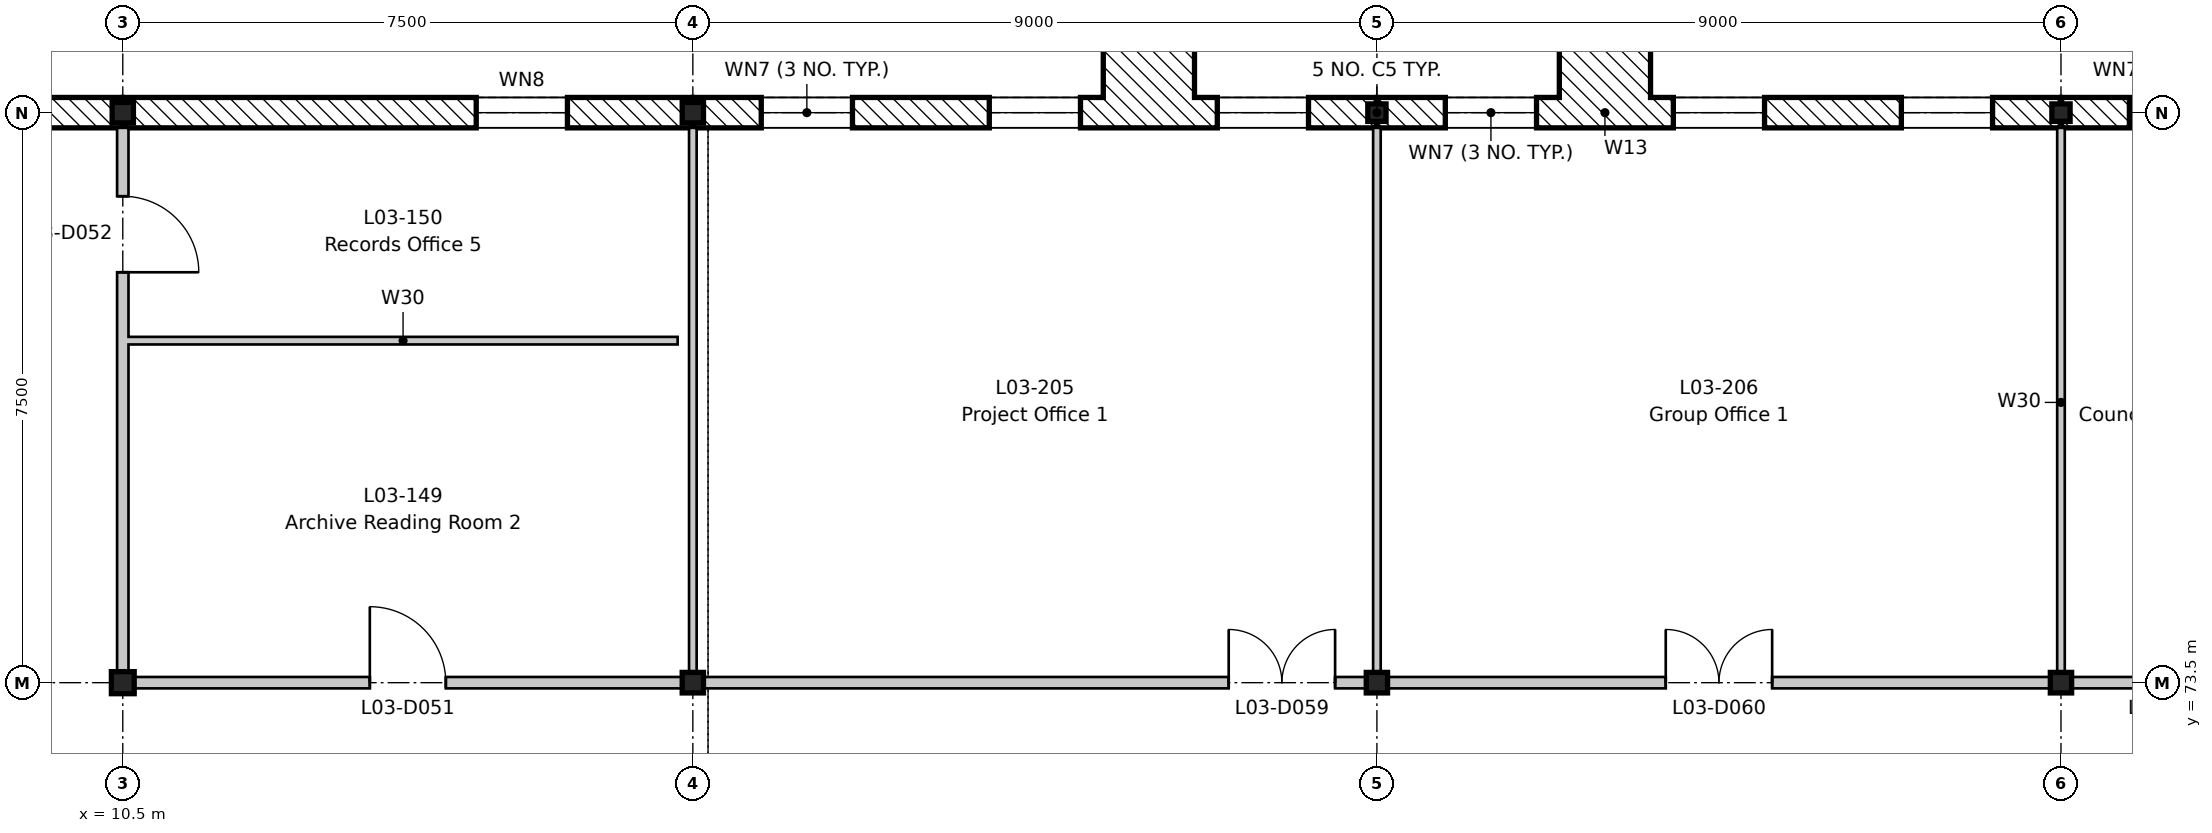
"""IFC4 building model, lengths in metres.
Left out: names, types, materials, properties, quantities, classifications, styles, units other than length and angle.
Written with IfcOpenShell. Run it as: python <this file> out.ifc"""

import sys

from ifc_helpers import new_model, si_unit, direction, frame, frame_2d, origin, origin_2d, place, context, subcontext, project, spatial, rectangle, i_section, extrude, element, fill, save


model = new_model("IFC4")
c1 = context("Model", 3, precision=1e-05, world=origin(), true_north=direction((0.0, 1.0)))
c2 = subcontext(c1, "Body", "Model", "MODEL_VIEW")
j1 = project(units=[si_unit("LENGTHUNIT", "METRE"), si_unit("PLANEANGLEUNIT", "RADIAN")], contexts=[c1])
p1 = place(None, origin())
s1 = spatial("IfcSite", under=j1, at=p1, CompositionType="ELEMENT")
p2 = place(p1, origin())
s2 = spatial("IfcBuilding", under=s1, at=p2, CompositionType="ELEMENT")
p3 = place(p2, frame((0.0, 0.0, 14.4)))
s3 = spatial("IfcBuildingStorey", under=s2, at=p3, CompositionType="ELEMENT", Elevation=14.4)
p4 = place(p3, frame((10.5, 73.5, -0.2), z_axis=(0.0, 0.0, 1.0), x_axis=(1.0, 0.0, 0.0)))
e1 = element("IfcColumn", 1, at=p4, inside=s3, PredefinedType="COLUMN", context=c2, shape_type="SweptSolid", body=[
    extrude(i_section(OverallWidth=0.3, OverallDepth=0.29, WebThickness=0.009, FlangeThickness=0.014, FilletRadius=0.027, at=origin_2d()), origin(), (0.0, 0.0, 1.0), 4.2),
])
for number, where, z_axis, x_axis in (
    (2, (10.5, 81.0, -0.2), (0.0, 0.0, 1.0), (1.0, 0.0, 0.0)),
    (3, (18.0, 73.5, -0.2), (0.0, 0.0, 1.0), (1.0, 0.0, 0.0)),
    (4, (18.0, 81.0, -0.2), (0.0, 0.0, 1.0), (1.0, 0.0, 0.0)),
    (5, (27.0, 73.5, -0.2), (0.0, 0.0, 1.0), (1.0, 0.0, 0.0)),
):
    element("IfcColumn", number, at=place(p3, frame(where, z_axis=z_axis, x_axis=x_axis)), inside=s3, PredefinedType="COLUMN", context=c2, shape_type="SweptSolid", body=[
        extrude(i_section(OverallWidth=0.28, OverallDepth=0.27, WebThickness=0.008, FlangeThickness=0.013, FilletRadius=0.024, at=origin_2d()), origin(), (0.0, 0.0, 1.0), 4.2),
    ])
p5 = place(p3, frame((27.0, 81.0, -0.2), z_axis=(0.0, 0.0, 1.0), x_axis=(1.0, 0.0, 0.0)))
e6 = element("IfcColumn", 6, at=p5, inside=s3, PredefinedType="COLUMN", context=c2, shape_type="SweptSolid", body=[
    extrude(i_section(OverallWidth=0.24, OverallDepth=0.23, WebThickness=0.008, FlangeThickness=0.012, FilletRadius=0.021, at=origin_2d()), origin(), (0.0, 0.0, 1.0), 4.2),
])
p6 = place(p3, frame((36.0, 73.5, -0.2), z_axis=(0.0, 0.0, 1.0), x_axis=(1.0, 0.0, 0.0)))
e7 = element("IfcColumn", 7, at=p6, inside=s3, PredefinedType="COLUMN", context=c2, shape_type="SweptSolid", body=[
    extrude(i_section(OverallWidth=0.28, OverallDepth=0.27, WebThickness=0.008, FlangeThickness=0.013, FilletRadius=0.024, at=origin_2d()), origin(), (0.0, 0.0, 1.0), 4.2),
])
p7 = place(p3, frame((36.0, 81.0, -0.2), z_axis=(0.0, 0.0, 1.0), x_axis=(1.0, 0.0, 0.0)))
e8 = element("IfcColumn", 8, at=p7, inside=s3, PredefinedType="COLUMN", context=c2, shape_type="SweptSolid", body=[
    extrude(i_section(OverallWidth=0.24, OverallDepth=0.23, WebThickness=0.008, FlangeThickness=0.012, FilletRadius=0.021, at=origin_2d()), origin(), (0.0, 0.0, 1.0), 4.2),
])
p8 = place(p3, frame((7.509, 81.0, 0.0), z_axis=(0.0, 0.0, 1.0), x_axis=(1.0, 0.0, 0.0)))
e9 = element("IfcWall", 9, at=p8, inside=s3, PredefinedType="STANDARD", context=c2, shape_type="SweptSolid", body=[
    extrude(rectangle(XDim=2.982, YDim=0.4, at=frame_2d((1.491, 0.0))), origin(), (0.0, 0.0, 1.0), 3.8),
])
p9 = place(p3, frame((10.509, 81.0, 0.0), z_axis=(0.0, 0.0, 1.0), x_axis=(1.0, 0.0, 0.0)))
e10 = element("IfcWall", 10, at=p9, inside=s3, PredefinedType="STANDARD", context=c2, shape_type="SweptSolid", body=[
    extrude(rectangle(XDim=7.482, YDim=0.4, at=frame_2d((3.741, 0.0))), origin(), (0.0, 0.0, 1.0), 3.67),
])
p10 = place(p9, frame((4.641, 0.0, 0.6)))
e11 = element("IfcOpeningElement", 11, at=p10, cuts=e10, PredefinedType="OPENING", context=c2, shape_type="SweptSolid", body=[
    extrude(rectangle(XDim=1.2, YDim=2.7, at=frame_2d((0.6, 1.35))), frame((0.0, 0.21, 0.0), z_axis=(0.0, -1.0, 0.0), x_axis=(1.0, 0.0, 0.0)), (0.0, 0.0, 1.0), 0.42),
])
p11 = place(p3, frame((18.009, 81.0, 0.0), z_axis=(0.0, 0.0, 1.0), x_axis=(1.0, 0.0, 0.0)))
e12 = element("IfcWall", 12, at=p11, inside=s3, PredefinedType="STANDARD", context=c2, shape_type="SweptSolid", body=[
    extrude(rectangle(XDim=8.982, YDim=0.4, at=frame_2d((4.491, 0.0))), origin(), (0.0, 0.0, 1.0), 3.6),
])
p12 = place(p11, frame((0.891, 0.0, 0.9)))
e13 = element("IfcOpeningElement", 13, at=p12, cuts=e12, PredefinedType="OPENING", context=c2, shape_type="SweptSolid", body=[
    extrude(rectangle(XDim=1.2, YDim=2.4, at=frame_2d((0.6, 1.2))), frame((0.0, 0.21, 0.0), z_axis=(0.0, -1.0, 0.0), x_axis=(1.0, 0.0, 0.0)), (0.0, 0.0, 1.0), 0.42),
])
p13 = place(p11, frame((3.891, 0.0, 0.9)))
e14 = element("IfcOpeningElement", 14, at=p13, cuts=e12, PredefinedType="OPENING", context=c2, shape_type="SweptSolid", body=[
    extrude(rectangle(XDim=1.2, YDim=2.4, at=frame_2d((0.6, 1.2))), frame((0.0, 0.21, 0.0), z_axis=(0.0, -1.0, 0.0), x_axis=(1.0, 0.0, 0.0)), (0.0, 0.0, 1.0), 0.42),
])
p14 = place(p11, frame((6.891, 0.0, 0.9)))
e15 = element("IfcOpeningElement", 15, at=p14, cuts=e12, PredefinedType="OPENING", context=c2, shape_type="SweptSolid", body=[
    extrude(rectangle(XDim=1.2, YDim=2.4, at=frame_2d((0.6, 1.2))), frame((0.0, 0.21, 0.0), z_axis=(0.0, -1.0, 0.0), x_axis=(1.0, 0.0, 0.0)), (0.0, 0.0, 1.0), 0.42),
])
p15 = place(p3, frame((27.009, 81.0, 0.0), z_axis=(0.0, 0.0, 1.0), x_axis=(1.0, 0.0, 0.0)))
e16 = element("IfcWall", 16, at=p15, inside=s3, PredefinedType="STANDARD", context=c2, shape_type="SweptSolid", body=[
    extrude(rectangle(XDim=8.982, YDim=0.4, at=frame_2d((4.491, 0.0))), origin(), (0.0, 0.0, 1.0), 3.6),
])
p16 = place(p15, frame((0.891, 0.0, 0.9)))
e17 = element("IfcOpeningElement", 17, at=p16, cuts=e16, PredefinedType="OPENING", context=c2, shape_type="SweptSolid", body=[
    extrude(rectangle(XDim=1.2, YDim=2.4, at=frame_2d((0.6, 1.2))), frame((0.0, 0.21, 0.0), z_axis=(0.0, -1.0, 0.0), x_axis=(1.0, 0.0, 0.0)), (0.0, 0.0, 1.0), 0.42),
])
p17 = place(p15, frame((3.891, 0.0, 0.9)))
e18 = element("IfcOpeningElement", 18, at=p17, cuts=e16, PredefinedType="OPENING", context=c2, shape_type="SweptSolid", body=[
    extrude(rectangle(XDim=1.2, YDim=2.4, at=frame_2d((0.6, 1.2))), frame((0.0, 0.21, 0.0), z_axis=(0.0, -1.0, 0.0), x_axis=(1.0, 0.0, 0.0)), (0.0, 0.0, 1.0), 0.42),
])
p18 = place(p15, frame((6.891, 0.0, 0.9)))
e19 = element("IfcOpeningElement", 19, at=p18, cuts=e16, PredefinedType="OPENING", context=c2, shape_type="SweptSolid", body=[
    extrude(rectangle(XDim=1.2, YDim=2.4, at=frame_2d((0.6, 1.2))), frame((0.0, 0.21, 0.0), z_axis=(0.0, -1.0, 0.0), x_axis=(1.0, 0.0, 0.0)), (0.0, 0.0, 1.0), 0.42),
])
p19 = place(p3, frame((36.009, 81.0, 0.0), z_axis=(0.0, 0.0, 1.0), x_axis=(1.0, 0.0, 0.0)))
e20 = element("IfcWall", 20, at=p19, inside=s3, PredefinedType="STANDARD", context=c2, shape_type="SweptSolid", body=[
    extrude(rectangle(XDim=8.982, YDim=0.4, at=frame_2d((4.491, 0.0))), origin(), (0.0, 0.0, 1.0), 3.6),
])
p20 = place(p19, frame((0.891, 0.0, 0.9)))
e21 = element("IfcOpeningElement", 21, at=p20, cuts=e20, PredefinedType="OPENING", context=c2, shape_type="SweptSolid", body=[
    extrude(rectangle(XDim=1.2, YDim=2.4, at=frame_2d((0.6, 1.2))), frame((0.0, 0.21, 0.0), z_axis=(0.0, -1.0, 0.0), x_axis=(1.0, 0.0, 0.0)), (0.0, 0.0, 1.0), 0.42),
])
p21 = place(p19, frame((3.891, 0.0, 0.9)))
e22 = element("IfcOpeningElement", 22, at=p21, cuts=e20, PredefinedType="OPENING", context=c2, shape_type="SweptSolid", body=[
    extrude(rectangle(XDim=1.2, YDim=2.4, at=frame_2d((0.6, 1.2))), frame((0.0, 0.21, 0.0), z_axis=(0.0, -1.0, 0.0), x_axis=(1.0, 0.0, 0.0)), (0.0, 0.0, 1.0), 0.42),
])
p22 = place(p19, frame((6.891, 0.0, 0.9)))
e23 = element("IfcOpeningElement", 23, at=p22, cuts=e20, PredefinedType="OPENING", context=c2, shape_type="SweptSolid", body=[
    extrude(rectangle(XDim=1.2, YDim=2.4, at=frame_2d((0.6, 1.2))), frame((0.0, 0.21, 0.0), z_axis=(0.0, -1.0, 0.0), x_axis=(1.0, 0.0, 0.0)), (0.0, 0.0, 1.0), 0.42),
])
for number, where, z_axis, x_axis in (
    (24, (23.4, 81.8, 0.0), (0.0, 0.0, 1.0), (1.0, 0.0, 0.0)),
    (25, (29.4, 81.8, 0.0), (0.0, 0.0, 1.0), (1.0, 0.0, 0.0)),
):
    element("IfcWall", number, at=place(p3, frame(where, z_axis=z_axis, x_axis=x_axis)), inside=s3, PredefinedType="STANDARD", context=c2, shape_type="SweptSolid", body=[
        extrude(rectangle(XDim=1.2, YDim=1.2, at=frame_2d((0.6, 0.0))), origin(), (0.0, 0.0, 1.0), 4.2),
    ])
p23 = place(p3, frame((10.5, 73.5, 0.0), z_axis=(0.0, 0.0, 1.0), x_axis=(0.0, 1.0, 0.0)))
e26 = element("IfcWall", 26, at=p23, inside=s3, PredefinedType="PARTITIONING", context=c2, shape_type="SweptSolid", body=[
    extrude(rectangle(XDim=7.3, YDim=0.15, at=frame_2d((3.65, 0.0))), origin(), (0.0, 0.0, 1.0), 3.48),
])
p24 = place(p23, frame((5.4, 0.0, 0.0)))
e27 = element("IfcOpeningElement", 27, at=p24, cuts=e26, PredefinedType="OPENING", context=c2, shape_type="SweptSolid", body=[
    extrude(rectangle(XDim=1.0, YDim=2.1, at=frame_2d((0.5, 1.05))), frame((0.0, 0.085, 0.0), z_axis=(0.0, -1.0, 0.0), x_axis=(1.0, 0.0, 0.0)), (0.0, 0.0, 1.0), 0.17),
])
p25 = place(p3, frame((10.575, 73.5, 0.0), z_axis=(0.0, 0.0, 1.0), x_axis=(1.0, 0.0, 0.0)))
e28 = element("IfcWall", 28, at=p25, inside=s3, PredefinedType="PARTITIONING", context=c2, shape_type="SweptSolid", body=[
    extrude(rectangle(XDim=7.425, YDim=0.15, at=frame_2d((3.712, 0.0))), origin(), (0.0, 0.0, 1.0), 3.65),
])
p26 = place(p25, frame((3.175, 0.0, 0.0)))
e29 = element("IfcOpeningElement", 29, at=p26, cuts=e28, PredefinedType="OPENING", context=c2, shape_type="SweptSolid", body=[
    extrude(rectangle(XDim=1.0, YDim=2.1, at=frame_2d((0.5, 1.05))), frame((0.0, 0.085, 0.0), z_axis=(0.0, -1.0, 0.0), x_axis=(1.0, 0.0, 0.0)), (0.0, 0.0, 1.0), 0.17),
])
p27 = place(p3, frame((10.575, 78.0, 0.0), z_axis=(0.0, 0.0, 1.0), x_axis=(1.0, 0.0, 0.0)))
e30 = element("IfcWall", 30, at=p27, inside=s3, PredefinedType="PARTITIONING", context=c2, shape_type="SweptSolid", body=[
    extrude(rectangle(XDim=7.225, YDim=0.1, at=frame_2d((3.613, 0.0))), origin(), (0.0, 0.0, 1.0), 4.0),
])
p28 = place(p3, frame((18.0, 73.575, 0.0), z_axis=(0.0, 0.0, 1.0), x_axis=(0.0, 1.0, 0.0)))
e31 = element("IfcWall", 31, at=p28, inside=s3, PredefinedType="PARTITIONING", context=c2, shape_type="SweptSolid", body=[
    extrude(rectangle(XDim=7.225, YDim=0.1, at=frame_2d((3.613, 0.0))), origin(), (0.0, 0.0, 1.0), 3.58),
])
for number, where, z_axis, x_axis in (
    (32, (27.0, 73.575, 0.0), (0.0, 0.0, 1.0), (0.0, 1.0, 0.0)),
    (33, (36.0, 73.575, 0.0), (0.0, 0.0, 1.0), (0.0, 1.0, 0.0)),
):
    element("IfcWall", number, at=place(p3, frame(where, z_axis=z_axis, x_axis=x_axis)), inside=s3, PredefinedType="PARTITIONING", context=c2, shape_type="SweptSolid", body=[
        extrude(rectangle(XDim=7.225, YDim=0.1, at=frame_2d((3.613, 0.0))), origin(), (0.0, 0.0, 1.0), 3.65),
    ])
p29 = place(p3, frame((18.0, 73.5, 0.0), z_axis=(0.0, 0.0, 1.0), x_axis=(1.0, 0.0, 0.0)))
e34 = element("IfcWall", 34, at=p29, inside=s3, PredefinedType="PARTITIONING", context=c2, shape_type="SweptSolid", body=[
    extrude(rectangle(XDim=35.8, YDim=0.15, at=frame_2d((17.9, 0.0))), origin(), (0.0, 0.0, 1.0), 3.48),
])
p30 = place(p29, frame((7.05, 0.0, 0.0)))
e35 = element("IfcOpeningElement", 35, at=p30, cuts=e34, PredefinedType="OPENING", context=c2, shape_type="SweptSolid", body=[
    extrude(rectangle(XDim=1.4, YDim=2.1, at=frame_2d((0.7, 1.05))), frame((0.0, 0.085, 0.0), z_axis=(0.0, -1.0, 0.0), x_axis=(1.0, 0.0, 0.0)), (0.0, 0.0, 1.0), 0.17),
])
p31 = place(p29, frame((12.8, 0.0, 0.0)))
e36 = element("IfcOpeningElement", 36, at=p31, cuts=e34, PredefinedType="OPENING", context=c2, shape_type="SweptSolid", body=[
    extrude(rectangle(XDim=1.4, YDim=2.1, at=frame_2d((0.7, 1.05))), frame((0.0, 0.085, 0.0), z_axis=(0.0, -1.0, 0.0), x_axis=(1.0, 0.0, 0.0)), (0.0, 0.0, 1.0), 0.17),
])
p32 = place(p29, frame((19.0, 0.0, 0.0)))
e37 = element("IfcOpeningElement", 37, at=p32, cuts=e34, PredefinedType="OPENING", context=c2, shape_type="SweptSolid", body=[
    extrude(rectangle(XDim=1.0, YDim=2.1, at=frame_2d((0.5, 1.05))), frame((0.0, 0.085, 0.0), z_axis=(0.0, -1.0, 0.0), x_axis=(1.0, 0.0, 0.0)), (0.0, 0.0, 1.0), 0.17),
])
p33 = place(p29, frame((22.0, 0.0, 0.0)))
e38 = element("IfcOpeningElement", 38, at=p33, cuts=e34, PredefinedType="OPENING", context=c2, shape_type="SweptSolid", body=[
    extrude(rectangle(XDim=1.0, YDim=2.1, at=frame_2d((0.5, 1.05))), frame((0.0, 0.085, 0.0), z_axis=(0.0, -1.0, 0.0), x_axis=(1.0, 0.0, 0.0)), (0.0, 0.0, 1.0), 0.17),
])
p34 = place(p29, frame((25.0, 0.0, 0.0)))
e39 = element("IfcOpeningElement", 39, at=p34, cuts=e34, PredefinedType="OPENING", context=c2, shape_type="SweptSolid", body=[
    extrude(rectangle(XDim=1.0, YDim=2.1, at=frame_2d((0.5, 1.05))), frame((0.0, 0.085, 0.0), z_axis=(0.0, -1.0, 0.0), x_axis=(1.0, 0.0, 0.0)), (0.0, 0.0, 1.0), 0.17),
])
p35 = place(p29, frame((28.0, 0.0, 0.0)))
e40 = element("IfcOpeningElement", 40, at=p35, cuts=e34, PredefinedType="OPENING", context=c2, shape_type="SweptSolid", body=[
    extrude(rectangle(XDim=1.0, YDim=2.1, at=frame_2d((0.5, 1.05))), frame((0.0, 0.085, 0.0), z_axis=(0.0, -1.0, 0.0), x_axis=(1.0, 0.0, 0.0)), (0.0, 0.0, 1.0), 0.17),
])
p36 = place(p29, frame((31.0, 0.0, 0.0)))
e41 = element("IfcOpeningElement", 41, at=p36, cuts=e34, PredefinedType="OPENING", context=c2, shape_type="SweptSolid", body=[
    extrude(rectangle(XDim=1.0, YDim=2.1, at=frame_2d((0.5, 1.05))), frame((0.0, 0.085, 0.0), z_axis=(0.0, -1.0, 0.0), x_axis=(1.0, 0.0, 0.0)), (0.0, 0.0, 1.0), 0.17),
])
p37 = place(p29, frame((34.0, 0.0, 0.0)))
e42 = element("IfcOpeningElement", 42, at=p37, cuts=e34, PredefinedType="OPENING", context=c2, shape_type="SweptSolid", body=[
    extrude(rectangle(XDim=1.0, YDim=2.1, at=frame_2d((0.5, 1.05))), frame((0.0, 0.085, 0.0), z_axis=(0.0, -1.0, 0.0), x_axis=(1.0, 0.0, 0.0)), (0.0, 0.0, 1.0), 0.17),
])
p38 = place(p10, origin())
e43 = element("IfcWindow", 43, at=p38, inside=s3, PartitioningType="SINGLE_PANEL", PredefinedType="WINDOW", context=c2, shape_type="SweptSolid", body=[
    extrude(rectangle(XDim=1.2, YDim=2.7, at=frame_2d((0.6, 1.35))), frame((0.0, 0.03, 0.0), z_axis=(0.0, -1.0, 0.0), x_axis=(1.0, 0.0, 0.0)), (0.0, 0.0, 1.0), 0.06),
])
fill(e11, e43)
p39 = place(p12, origin())
e44 = element("IfcWindow", 44, at=p39, inside=s3, PartitioningType="SINGLE_PANEL", PredefinedType="WINDOW", context=c2, shape_type="SweptSolid", body=[
    extrude(rectangle(XDim=1.2, YDim=2.4, at=frame_2d((0.6, 1.2))), frame((0.0, -0.12, 0.0), z_axis=(0.0, -1.0, 0.0), x_axis=(1.0, 0.0, 0.0)), (0.0, 0.0, 1.0), 0.06),
])
fill(e13, e44)
p40 = place(p13, origin())
e45 = element("IfcWindow", 45, at=p40, inside=s3, PartitioningType="SINGLE_PANEL", PredefinedType="WINDOW", context=c2, shape_type="SweptSolid", body=[
    extrude(rectangle(XDim=1.2, YDim=2.4, at=frame_2d((0.6, 1.2))), frame((0.0, -0.12, 0.0), z_axis=(0.0, -1.0, 0.0), x_axis=(1.0, 0.0, 0.0)), (0.0, 0.0, 1.0), 0.06),
])
fill(e14, e45)
p41 = place(p14, origin())
e46 = element("IfcWindow", 46, at=p41, inside=s3, PartitioningType="SINGLE_PANEL", PredefinedType="WINDOW", context=c2, shape_type="SweptSolid", body=[
    extrude(rectangle(XDim=1.2, YDim=2.4, at=frame_2d((0.6, 1.2))), frame((0.0, -0.12, 0.0), z_axis=(0.0, -1.0, 0.0), x_axis=(1.0, 0.0, 0.0)), (0.0, 0.0, 1.0), 0.06),
])
fill(e15, e46)
p42 = place(p16, origin())
e47 = element("IfcWindow", 47, at=p42, inside=s3, PartitioningType="SINGLE_PANEL", PredefinedType="WINDOW", context=c2, shape_type="SweptSolid", body=[
    extrude(rectangle(XDim=1.2, YDim=2.4, at=frame_2d((0.6, 1.2))), frame((0.0, -0.12, 0.0), z_axis=(0.0, -1.0, 0.0), x_axis=(1.0, 0.0, 0.0)), (0.0, 0.0, 1.0), 0.06),
])
fill(e17, e47)
p43 = place(p17, origin())
e48 = element("IfcWindow", 48, at=p43, inside=s3, PartitioningType="SINGLE_PANEL", PredefinedType="WINDOW", context=c2, shape_type="SweptSolid", body=[
    extrude(rectangle(XDim=1.2, YDim=2.4, at=frame_2d((0.6, 1.2))), frame((0.0, -0.12, 0.0), z_axis=(0.0, -1.0, 0.0), x_axis=(1.0, 0.0, 0.0)), (0.0, 0.0, 1.0), 0.06),
])
fill(e18, e48)
p44 = place(p18, origin())
e49 = element("IfcWindow", 49, at=p44, inside=s3, PartitioningType="SINGLE_PANEL", PredefinedType="WINDOW", context=c2, shape_type="SweptSolid", body=[
    extrude(rectangle(XDim=1.2, YDim=2.4, at=frame_2d((0.6, 1.2))), frame((0.0, -0.12, 0.0), z_axis=(0.0, -1.0, 0.0), x_axis=(1.0, 0.0, 0.0)), (0.0, 0.0, 1.0), 0.06),
])
fill(e19, e49)
p45 = place(p20, origin())
e50 = element("IfcWindow", 50, at=p45, inside=s3, PartitioningType="SINGLE_PANEL", PredefinedType="WINDOW", context=c2, shape_type="SweptSolid", body=[
    extrude(rectangle(XDim=1.2, YDim=2.4, at=frame_2d((0.6, 1.2))), frame((0.0, -0.12, 0.0), z_axis=(0.0, -1.0, 0.0), x_axis=(1.0, 0.0, 0.0)), (0.0, 0.0, 1.0), 0.06),
])
fill(e21, e50)
p46 = place(p26, origin())
e51 = element("IfcDoor", 51, at=p46, inside=s3, OperationType="SINGLE_SWING_LEFT", PredefinedType="DOOR", context=c2, shape_type="SweptSolid", body=[
    extrude(rectangle(XDim=1.0, YDim=2.1, at=frame_2d((0.5, 1.05))), frame((0.0, 0.025, 0.0), z_axis=(0.0, -1.0, 0.0), x_axis=(1.0, 0.0, 0.0)), (0.0, 0.0, 1.0), 0.05),
])
fill(e29, e51)
p47 = place(p24, frame((1.0, 0.0, 0.0), z_axis=(0.0, 0.0, 1.0), x_axis=(-1.0, 0.0, 0.0)))
e52 = element("IfcDoor", 52, at=p47, inside=s3, OperationType="SINGLE_SWING_RIGHT", PredefinedType="DOOR", context=c2, shape_type="SweptSolid", body=[
    extrude(rectangle(XDim=1.0, YDim=2.1, at=frame_2d((0.5, 1.05))), frame((0.0, 0.025, 0.0), z_axis=(0.0, -1.0, 0.0), x_axis=(1.0, 0.0, 0.0)), (0.0, 0.0, 1.0), 0.05),
])
fill(e27, e52)
p48 = place(p30, origin())
e53 = element("IfcDoor", 53, at=p48, inside=s3, OperationType="DOUBLE_DOOR_SINGLE_SWING", PredefinedType="DOOR", context=c2, shape_type="SweptSolid", body=[
    extrude(rectangle(XDim=1.4, YDim=2.1, at=frame_2d((0.7, 1.05))), frame((0.0, 0.025, 0.0), z_axis=(0.0, -1.0, 0.0), x_axis=(1.0, 0.0, 0.0)), (0.0, 0.0, 1.0), 0.05),
])
fill(e35, e53)
p49 = place(p31, origin())
e54 = element("IfcDoor", 54, at=p49, inside=s3, OperationType="DOUBLE_DOOR_SINGLE_SWING", PredefinedType="DOOR", context=c2, shape_type="SweptSolid", body=[
    extrude(rectangle(XDim=1.4, YDim=2.1, at=frame_2d((0.7, 1.05))), frame((0.0, 0.025, 0.0), z_axis=(0.0, -1.0, 0.0), x_axis=(1.0, 0.0, 0.0)), (0.0, 0.0, 1.0), 0.05),
])
fill(e36, e54)
save(model, sys.argv[1])
